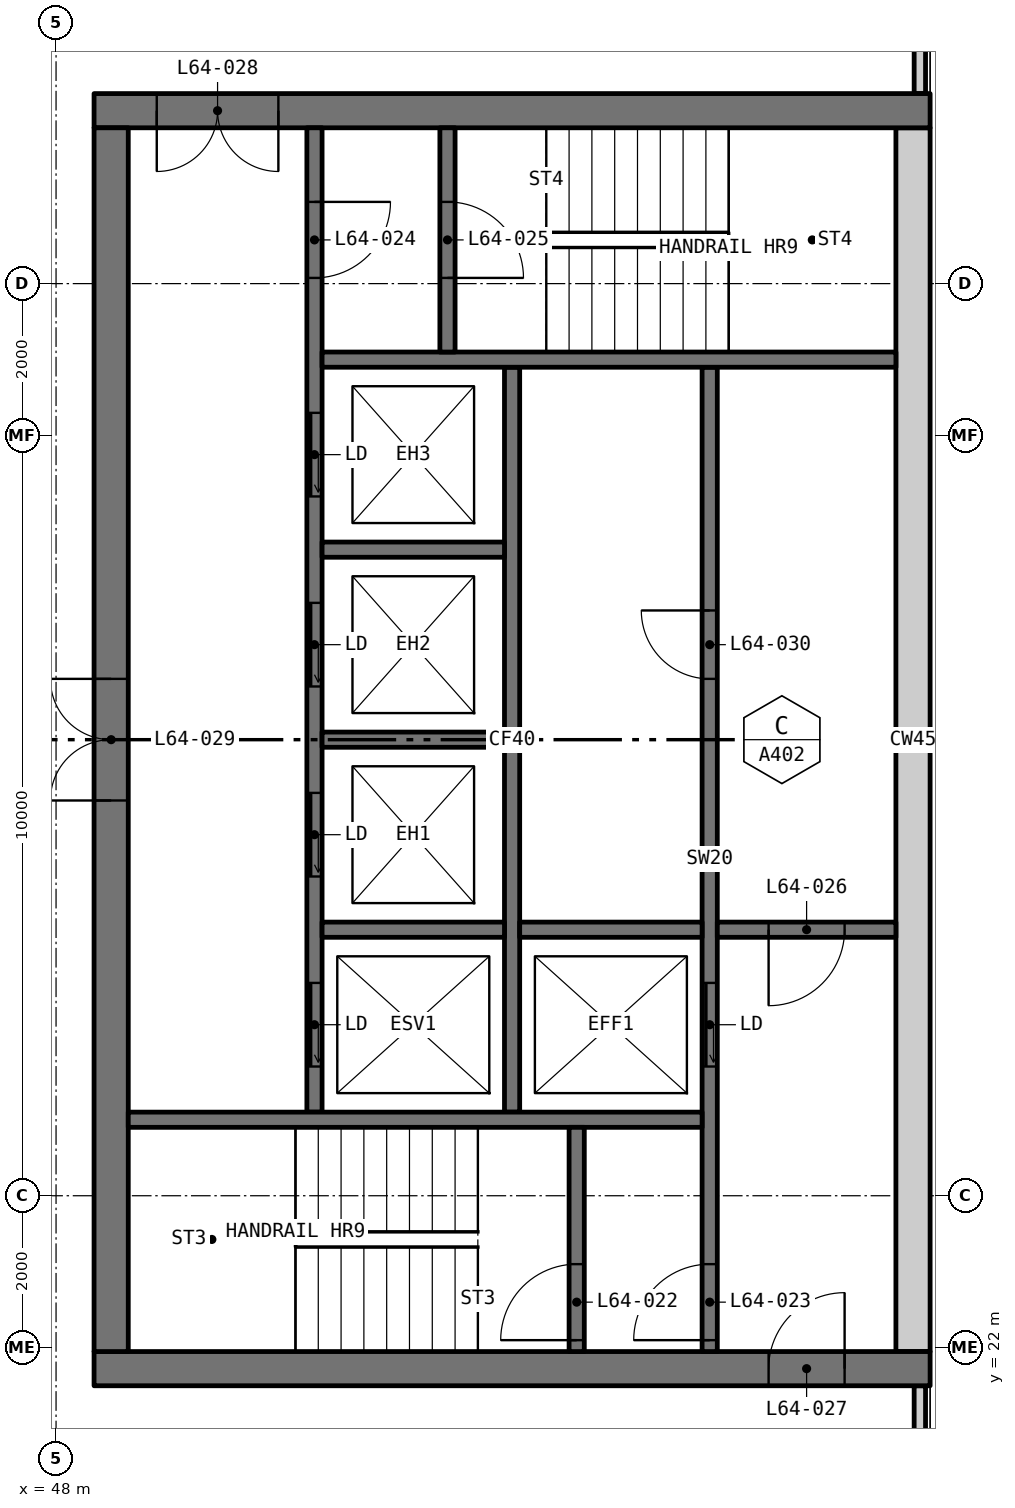
"""IFC4 building model, lengths in metres.
Left out: names, types, materials, properties, quantities, classifications, styles, units other than length and angle.
Written with IfcOpenShell. Run it as: python <this file> out.ifc"""

import sys

from ifc_helpers import new_model, si_unit, direction, frame, frame_2d, origin, place, context, subcontext, project, spatial, rectangle, extrude, element, fill, save


model = new_model("IFC4")
c1 = context("Model", 3, precision=1e-05, world=origin(), true_north=direction((0.0, 1.0)))
c2 = subcontext(c1, "Body", "Model", "MODEL_VIEW")
j1 = project(units=[si_unit("LENGTHUNIT", "METRE"), si_unit("PLANEANGLEUNIT", "RADIAN")], contexts=[c1])
p1 = place(None, origin())
s1 = spatial("IfcSite", under=j1, at=p1, CompositionType="ELEMENT")
p2 = place(p1, origin())
s2 = spatial("IfcBuilding", under=s1, at=p2, CompositionType="ELEMENT")
p3 = place(p2, frame((0.0, 0.0, 238.65)))
s3 = spatial("IfcBuildingStorey", under=s2, at=p3, CompositionType="ELEMENT", Elevation=238.65)
for number, where, z_axis, x_axis in (
    (1, (59.365, 18.71, 0.0), (0.0, 0.0, 1.0), (0.0, 1.0, 0.0)),
    (2, (59.365, 38.5, 0.0), (0.0, 0.0, 1.0), (0.0, 1.0, 0.0)),
):
    element("IfcWall", number, at=place(p3, frame(where, z_axis=z_axis, x_axis=x_axis)), inside=s3, PredefinedType="ELEMENTEDWALL", context=c2, shape_type="SweptSolid", body=[
        extrude(rectangle(XDim=2.79, YDim=0.15, at=frame_2d((1.395, 0.0))), origin(), (0.0, 0.0, 1.0), 3.05),
    ])
p4 = place(p3, frame((59.5, 21.725, 0.0), z_axis=(0.0, 0.0, 1.0), x_axis=(-1.0, 0.0, 0.0)))
e3 = element("IfcWall", 3, at=p4, inside=s3, PredefinedType="SHEAR", context=c2, shape_type="SweptSolid", body=[
    extrude(rectangle(XDim=11.0, YDim=0.45, at=frame_2d((5.5, 0.0))), origin(), (0.0, 0.0, 1.0), 3.05),
])
p5 = place(p4, frame((1.125, 0.0, 0.0)))
e4 = element("IfcOpeningElement", 4, at=p5, cuts=e3, PredefinedType="OPENING", context=c2, shape_type="SweptSolid", body=[
    extrude(rectangle(XDim=1.0, YDim=2.1, at=frame_2d((0.5, 1.05))), frame((0.0, 0.235, 0.0), z_axis=(0.0, -1.0, 0.0), x_axis=(1.0, 0.0, 0.0)), (0.0, 0.0, 1.0), 0.47),
])
p6 = place(p3, frame((59.5, 38.275, 0.0), z_axis=(0.0, 0.0, 1.0), x_axis=(-1.0, 0.0, 0.0)))
e5 = element("IfcWall", 5, at=p6, inside=s3, PredefinedType="SHEAR", context=c2, shape_type="SweptSolid", body=[
    extrude(rectangle(XDim=11.0, YDim=0.45, at=frame_2d((5.5, 0.0))), origin(), (0.0, 0.0, 1.0), 3.05),
])
p7 = place(p6, frame((8.575, 0.0, 0.0)))
e6 = element("IfcOpeningElement", 6, at=p7, cuts=e5, PredefinedType="OPENING", context=c2, shape_type="SweptSolid", body=[
    extrude(rectangle(XDim=1.6, YDim=2.1, at=frame_2d((0.8, 1.05))), frame((0.0, 0.235, 0.0), z_axis=(0.0, -1.0, 0.0), x_axis=(1.0, 0.0, 0.0)), (0.0, 0.0, 1.0), 0.47),
])
p8 = place(p3, frame((59.275, 21.95, 0.0), z_axis=(0.0, 0.0, 1.0), x_axis=(0.0, 1.0, 0.0)))
e7 = element("IfcWall", 7, at=p8, inside=s3, PredefinedType="SHEAR", context=c2, shape_type="SweptSolid", body=[
    extrude(rectangle(XDim=16.1, YDim=0.45, at=frame_2d((8.05, 0.0))), origin(), (0.0, 0.0, 1.0), 3.05),
])
p9 = place(p3, frame((48.725, 21.95, 0.0), z_axis=(0.0, 0.0, 1.0), x_axis=(0.0, 1.0, 0.0)))
e8 = element("IfcWall", 8, at=p9, inside=s3, PredefinedType="SHEAR", context=c2, shape_type="SweptSolid", body=[
    extrude(rectangle(XDim=16.1, YDim=0.45, at=frame_2d((8.05, 0.0))), origin(), (0.0, 0.0, 1.0), 3.05),
])
p10 = place(p9, frame((7.25, 0.0, 0.0)))
e9 = element("IfcOpeningElement", 9, at=p10, cuts=e8, PredefinedType="OPENING", context=c2, shape_type="SweptSolid", body=[
    extrude(rectangle(XDim=1.6, YDim=2.1, at=frame_2d((0.8, 1.05))), frame((0.0, 0.235, 0.0), z_axis=(0.0, -1.0, 0.0), x_axis=(1.0, 0.0, 0.0)), (0.0, 0.0, 1.0), 0.47),
])
p11 = place(p3, frame((56.6, 21.95, 0.0), z_axis=(0.0, 0.0, 1.0), x_axis=(0.0, 1.0, 0.0)))
e10 = element("IfcWall", 10, at=p11, inside=s3, PredefinedType="SOLIDWALL", context=c2, shape_type="SweptSolid", body=[
    extrude(rectangle(XDim=12.95, YDim=0.2, at=frame_2d((6.475, 0.0))), origin(), (0.0, 0.0, 1.0), 3.05),
])
p12 = place(p11, frame((3.75, 0.0, 0.0)))
e11 = element("IfcOpeningElement", 11, at=p12, cuts=e10, PredefinedType="OPENING", context=c2, shape_type="SweptSolid", body=[
    extrude(rectangle(XDim=1.1, YDim=2.1, at=frame_2d((0.55, 1.05))), frame((0.0, 0.11, 0.0), z_axis=(0.0, -1.0, 0.0), x_axis=(1.0, 0.0, 0.0)), (0.0, 0.0, 1.0), 0.22),
])
p13 = place(p11, frame((0.15, 0.0, 0.0)))
e12 = element("IfcOpeningElement", 12, at=p13, cuts=e10, PredefinedType="OPENING", context=c2, shape_type="SweptSolid", body=[
    extrude(rectangle(XDim=1.0, YDim=2.1, at=frame_2d((0.5, 1.05))), frame((0.0, 0.11, 0.0), z_axis=(0.0, -1.0, 0.0), x_axis=(1.0, 0.0, 0.0)), (0.0, 0.0, 1.0), 0.22),
])
p14 = place(p11, frame((8.85, 0.0, 0.0)))
e13 = element("IfcOpeningElement", 13, at=p14, cuts=e10, PredefinedType="OPENING", context=c2, shape_type="SweptSolid", body=[
    extrude(rectangle(XDim=0.9, YDim=2.1, at=frame_2d((0.45, 1.05))), frame((0.0, 0.11, 0.0), z_axis=(0.0, -1.0, 0.0), x_axis=(1.0, 0.0, 0.0)), (0.0, 0.0, 1.0), 0.22),
])
p15 = place(p3, frame((51.4, 25.1, 0.0), z_axis=(0.0, 0.0, 1.0), x_axis=(0.0, 1.0, 0.0)))
e14 = element("IfcWall", 14, at=p15, inside=s3, PredefinedType="SOLIDWALL", context=c2, shape_type="SweptSolid", body=[
    extrude(rectangle(XDim=12.95, YDim=0.2, at=frame_2d((6.475, 0.0))), origin(), (0.0, 0.0, 1.0), 3.05),
])
p16 = place(p15, frame((0.6, 0.0, 0.0)))
e15 = element("IfcOpeningElement", 15, at=p16, cuts=e14, PredefinedType="OPENING", context=c2, shape_type="SweptSolid", body=[
    extrude(rectangle(XDim=1.1, YDim=2.1, at=frame_2d((0.55, 1.05))), frame((0.0, 0.11, 0.0), z_axis=(0.0, -1.0, 0.0), x_axis=(1.0, 0.0, 0.0)), (0.0, 0.0, 1.0), 0.22),
])
p17 = place(p15, frame((3.1, 0.0, 0.0)))
e16 = element("IfcOpeningElement", 16, at=p17, cuts=e14, PredefinedType="OPENING", context=c2, shape_type="SweptSolid", body=[
    extrude(rectangle(XDim=1.1, YDim=2.1, at=frame_2d((0.55, 1.05))), frame((0.0, 0.11, 0.0), z_axis=(0.0, -1.0, 0.0), x_axis=(1.0, 0.0, 0.0)), (0.0, 0.0, 1.0), 0.22),
])
p18 = place(p15, frame((5.6, 0.0, 0.0)))
e17 = element("IfcOpeningElement", 17, at=p18, cuts=e14, PredefinedType="OPENING", context=c2, shape_type="SweptSolid", body=[
    extrude(rectangle(XDim=1.1, YDim=2.1, at=frame_2d((0.55, 1.05))), frame((0.0, 0.11, 0.0), z_axis=(0.0, -1.0, 0.0), x_axis=(1.0, 0.0, 0.0)), (0.0, 0.0, 1.0), 0.22),
])
p19 = place(p15, frame((8.1, 0.0, 0.0)))
e18 = element("IfcOpeningElement", 18, at=p19, cuts=e14, PredefinedType="OPENING", context=c2, shape_type="SweptSolid", body=[
    extrude(rectangle(XDim=1.1, YDim=2.1, at=frame_2d((0.55, 1.05))), frame((0.0, 0.11, 0.0), z_axis=(0.0, -1.0, 0.0), x_axis=(1.0, 0.0, 0.0)), (0.0, 0.0, 1.0), 0.22),
])
p20 = place(p15, frame((10.975, 0.0, 0.0)))
e19 = element("IfcOpeningElement", 19, at=p20, cuts=e14, PredefinedType="OPENING", context=c2, shape_type="SweptSolid", body=[
    extrude(rectangle(XDim=1.0, YDim=2.1, at=frame_2d((0.5, 1.05))), frame((0.0, 0.11, 0.0), z_axis=(0.0, -1.0, 0.0), x_axis=(1.0, 0.0, 0.0)), (0.0, 0.0, 1.0), 0.22),
])
p21 = place(p3, frame((54.0, 25.1, 0.0), z_axis=(0.0, 0.0, 1.0), x_axis=(0.0, 1.0, 0.0)))
e20 = element("IfcWall", 20, at=p21, inside=s3, PredefinedType="SOLIDWALL", context=c2, shape_type="SweptSolid", body=[
    extrude(rectangle(XDim=9.8, YDim=0.2, at=frame_2d((4.9, 0.0))), origin(), (0.0, 0.0, 1.0), 3.05),
])
for number, where, z_axis, x_axis in (
    (21, (56.5, 25.0, 0.0), (0.0, 0.0, 1.0), (-1.0, 0.0, 0.0)),
    (22, (59.05, 35.0, 0.0), (0.0, 0.0, 1.0), (-1.0, 0.0, 0.0)),
):
    element("IfcWall", number, at=place(p3, frame(where, z_axis=z_axis, x_axis=x_axis)), inside=s3, PredefinedType="SOLIDWALL", context=c2, shape_type="SweptSolid", body=[
        extrude(rectangle(XDim=7.55, YDim=0.2, at=frame_2d((3.775, 0.0))), origin(), (0.0, 0.0, 1.0), 3.05),
    ])
p22 = place(p3, frame((59.05, 27.5, 0.0), z_axis=(0.0, 0.0, 1.0), x_axis=(-1.0, 0.0, 0.0)))
e23 = element("IfcWall", 23, at=p22, inside=s3, PredefinedType="SOLIDWALL", context=c2, shape_type="SweptSolid", body=[
    extrude(rectangle(XDim=2.35, YDim=0.2, at=frame_2d((1.175, 0.0))), origin(), (0.0, 0.0, 1.0), 3.05),
])
p23 = place(p22, frame((0.675, 0.0, 0.0)))
e24 = element("IfcOpeningElement", 24, at=p23, cuts=e23, PredefinedType="OPENING", context=c2, shape_type="SweptSolid", body=[
    extrude(rectangle(XDim=1.0, YDim=2.1, at=frame_2d((0.5, 1.05))), frame((0.0, 0.11, 0.0), z_axis=(0.0, -1.0, 0.0), x_axis=(1.0, 0.0, 0.0)), (0.0, 0.0, 1.0), 0.22),
])
p24 = place(p3, frame((54.85, 21.95, 0.0), z_axis=(0.0, 0.0, 1.0), x_axis=(0.0, 1.0, 0.0)))
e25 = element("IfcWall", 25, at=p24, inside=s3, PredefinedType="SOLIDWALL", context=c2, shape_type="SweptSolid", body=[
    extrude(rectangle(XDim=2.95, YDim=0.2, at=frame_2d((1.475, 0.0))), origin(), (0.0, 0.0, 1.0), 3.05),
])
p25 = place(p24, frame((0.15, 0.0, 0.0)))
e26 = element("IfcOpeningElement", 26, at=p25, cuts=e25, PredefinedType="OPENING", context=c2, shape_type="SweptSolid", body=[
    extrude(rectangle(XDim=1.0, YDim=2.1, at=frame_2d((0.5, 1.05))), frame((0.0, 0.11, 0.0), z_axis=(0.0, -1.0, 0.0), x_axis=(1.0, 0.0, 0.0)), (0.0, 0.0, 1.0), 0.22),
])
p26 = place(p3, frame((53.15, 35.1, 0.0), z_axis=(0.0, 0.0, 1.0), x_axis=(0.0, 1.0, 0.0)))
e27 = element("IfcWall", 27, at=p26, inside=s3, PredefinedType="SOLIDWALL", context=c2, shape_type="SweptSolid", body=[
    extrude(rectangle(XDim=2.95, YDim=0.2, at=frame_2d((1.475, 0.0))), origin(), (0.0, 0.0, 1.0), 3.05),
])
p27 = place(p26, frame((0.975, 0.0, 0.0)))
e28 = element("IfcOpeningElement", 28, at=p27, cuts=e27, PredefinedType="OPENING", context=c2, shape_type="SweptSolid", body=[
    extrude(rectangle(XDim=1.0, YDim=2.1, at=frame_2d((0.5, 1.05))), frame((0.0, 0.11, 0.0), z_axis=(0.0, -1.0, 0.0), x_axis=(1.0, 0.0, 0.0)), (0.0, 0.0, 1.0), 0.22),
])
for number, where, z_axis, x_axis in (
    (29, (56.5, 27.5, 0.0), (0.0, 0.0, 1.0), (-1.0, 0.0, 0.0)),
    (30, (53.9, 27.5, 0.0), (0.0, 0.0, 1.0), (-1.0, 0.0, 0.0)),
    (31, (53.9, 30.0, 0.0), (0.0, 0.0, 1.0), (-1.0, 0.0, 0.0)),
    (32, (53.9, 32.5, 0.0), (0.0, 0.0, 1.0), (-1.0, 0.0, 0.0)),
):
    element("IfcWall", number, at=place(p3, frame(where, z_axis=z_axis, x_axis=x_axis)), inside=s3, PredefinedType="SOLIDWALL", context=c2, shape_type="SweptSolid", body=[
        extrude(rectangle(XDim=2.4, YDim=0.2, at=frame_2d((1.2, 0.0))), origin(), (0.0, 0.0, 1.0), 3.05),
    ])
p28 = place(p16, origin())
e33 = element("IfcDoor", 33, at=p28, inside=s3, OperationType="SLIDING_TO_LEFT", PredefinedType="DOOR", context=c2, shape_type="SweptSolid", body=[
    extrude(rectangle(XDim=1.1, YDim=2.1, at=frame_2d((0.55, 1.05))), frame((0.0, 0.025, 0.0), z_axis=(0.0, -1.0, 0.0), x_axis=(1.0, 0.0, 0.0)), (0.0, 0.0, 1.0), 0.05),
])
fill(e15, e33)
p29 = place(p17, origin())
e34 = element("IfcDoor", 34, at=p29, inside=s3, OperationType="SLIDING_TO_LEFT", PredefinedType="DOOR", context=c2, shape_type="SweptSolid", body=[
    extrude(rectangle(XDim=1.1, YDim=2.1, at=frame_2d((0.55, 1.05))), frame((0.0, 0.025, 0.0), z_axis=(0.0, -1.0, 0.0), x_axis=(1.0, 0.0, 0.0)), (0.0, 0.0, 1.0), 0.05),
])
fill(e16, e34)
p30 = place(p18, origin())
e35 = element("IfcDoor", 35, at=p30, inside=s3, OperationType="SLIDING_TO_LEFT", PredefinedType="DOOR", context=c2, shape_type="SweptSolid", body=[
    extrude(rectangle(XDim=1.1, YDim=2.1, at=frame_2d((0.55, 1.05))), frame((0.0, 0.025, 0.0), z_axis=(0.0, -1.0, 0.0), x_axis=(1.0, 0.0, 0.0)), (0.0, 0.0, 1.0), 0.05),
])
fill(e17, e35)
p31 = place(p19, origin())
e36 = element("IfcDoor", 36, at=p31, inside=s3, OperationType="SLIDING_TO_LEFT", PredefinedType="DOOR", context=c2, shape_type="SweptSolid", body=[
    extrude(rectangle(XDim=1.1, YDim=2.1, at=frame_2d((0.55, 1.05))), frame((0.0, 0.025, 0.0), z_axis=(0.0, -1.0, 0.0), x_axis=(1.0, 0.0, 0.0)), (0.0, 0.0, 1.0), 0.05),
])
fill(e18, e36)
p32 = place(p12, origin())
e37 = element("IfcDoor", 37, at=p32, inside=s3, OperationType="SLIDING_TO_LEFT", PredefinedType="DOOR", context=c2, shape_type="SweptSolid", body=[
    extrude(rectangle(XDim=1.1, YDim=2.1, at=frame_2d((0.55, 1.05))), frame((0.0, 0.025, 0.0), z_axis=(0.0, -1.0, 0.0), x_axis=(1.0, 0.0, 0.0)), (0.0, 0.0, 1.0), 0.05),
])
fill(e11, e37)
p33 = place(p25, origin())
e38 = element("IfcDoor", 38, at=p33, inside=s3, OperationType="SINGLE_SWING_RIGHT", PredefinedType="DOOR", context=c2, shape_type="SweptSolid", body=[
    extrude(rectangle(XDim=1.0, YDim=2.1, at=frame_2d((0.5, 1.05))), frame((0.0, 0.025, 0.0), z_axis=(0.0, -1.0, 0.0), x_axis=(1.0, 0.0, 0.0)), (0.0, 0.0, 1.0), 0.05),
])
fill(e26, e38)
p34 = place(p13, origin())
e39 = element("IfcDoor", 39, at=p34, inside=s3, OperationType="SINGLE_SWING_RIGHT", PredefinedType="DOOR", context=c2, shape_type="SweptSolid", body=[
    extrude(rectangle(XDim=1.0, YDim=2.1, at=frame_2d((0.5, 1.05))), frame((0.0, 0.025, 0.0), z_axis=(0.0, -1.0, 0.0), x_axis=(1.0, 0.0, 0.0)), (0.0, 0.0, 1.0), 0.05),
])
fill(e12, e39)
p35 = place(p20, frame((1.0, 0.0, 0.0), x_axis=(-1.0, 0.0, 0.0)))
e40 = element("IfcDoor", 40, at=p35, inside=s3, OperationType="SINGLE_SWING_RIGHT", PredefinedType="DOOR", context=c2, shape_type="SweptSolid", body=[
    extrude(rectangle(XDim=1.0, YDim=2.1, at=frame_2d((0.5, 1.05))), frame((0.0, 0.025, 0.0), z_axis=(0.0, -1.0, 0.0), x_axis=(1.0, 0.0, 0.0)), (0.0, 0.0, 1.0), 0.05),
])
fill(e19, e40)
p36 = place(p27, frame((1.0, 0.0, 0.0), x_axis=(-1.0, 0.0, 0.0)))
e41 = element("IfcDoor", 41, at=p36, inside=s3, OperationType="SINGLE_SWING_LEFT", PredefinedType="DOOR", context=c2, shape_type="SweptSolid", body=[
    extrude(rectangle(XDim=1.0, YDim=2.1, at=frame_2d((0.5, 1.05))), frame((0.0, 0.025, 0.0), z_axis=(0.0, -1.0, 0.0), x_axis=(1.0, 0.0, 0.0)), (0.0, 0.0, 1.0), 0.05),
])
fill(e28, e41)
p37 = place(p23, origin())
e42 = element("IfcDoor", 42, at=p37, inside=s3, OperationType="SINGLE_SWING_LEFT", PredefinedType="DOOR", context=c2, shape_type="SweptSolid", body=[
    extrude(rectangle(XDim=1.0, YDim=2.1, at=frame_2d((0.5, 1.05))), frame((0.0, 0.025, 0.0), z_axis=(0.0, -1.0, 0.0), x_axis=(1.0, 0.0, 0.0)), (0.0, 0.0, 1.0), 0.05),
])
fill(e24, e42)
p38 = place(p5, frame((1.0, 0.0, 0.0), x_axis=(-1.0, 0.0, 0.0)))
e43 = element("IfcDoor", 43, at=p38, inside=s3, OperationType="SINGLE_SWING_LEFT", PredefinedType="DOOR", context=c2, shape_type="SweptSolid", body=[
    extrude(rectangle(XDim=1.0, YDim=2.1, at=frame_2d((0.5, 1.05))), frame((0.0, 0.025, 0.0), z_axis=(0.0, -1.0, 0.0), x_axis=(1.0, 0.0, 0.0)), (0.0, 0.0, 1.0), 0.05),
])
fill(e4, e43)
p39 = place(p7, origin())
e44 = element("IfcDoor", 44, at=p39, inside=s3, OperationType="DOUBLE_DOOR_SINGLE_SWING", PredefinedType="DOOR", context=c2, shape_type="SweptSolid", body=[
    extrude(rectangle(XDim=1.6, YDim=2.1, at=frame_2d((0.8, 1.05))), frame((0.0, 0.025, 0.0), z_axis=(0.0, -1.0, 0.0), x_axis=(1.0, 0.0, 0.0)), (0.0, 0.0, 1.0), 0.05),
])
fill(e6, e44)
p40 = place(p10, origin())
e45 = element("IfcDoor", 45, at=p40, inside=s3, OperationType="DOUBLE_DOOR_SINGLE_SWING", PredefinedType="DOOR", context=c2, shape_type="SweptSolid", body=[
    extrude(rectangle(XDim=1.6, YDim=2.1, at=frame_2d((0.8, 1.05))), frame((0.0, 0.025, 0.0), z_axis=(0.0, -1.0, 0.0), x_axis=(1.0, 0.0, 0.0)), (0.0, 0.0, 1.0), 0.05),
])
fill(e9, e45)
p41 = place(p14, origin())
e46 = element("IfcDoor", 46, at=p41, inside=s3, OperationType="SINGLE_SWING_LEFT", PredefinedType="DOOR", context=c2, shape_type="SweptSolid", body=[
    extrude(rectangle(XDim=0.9, YDim=2.1, at=frame_2d((0.45, 1.05))), frame((0.0, 0.025, 0.0), z_axis=(0.0, -1.0, 0.0), x_axis=(1.0, 0.0, 0.0)), (0.0, 0.0, 1.0), 0.05),
])
fill(e13, e46)
save(model, sys.argv[1])
